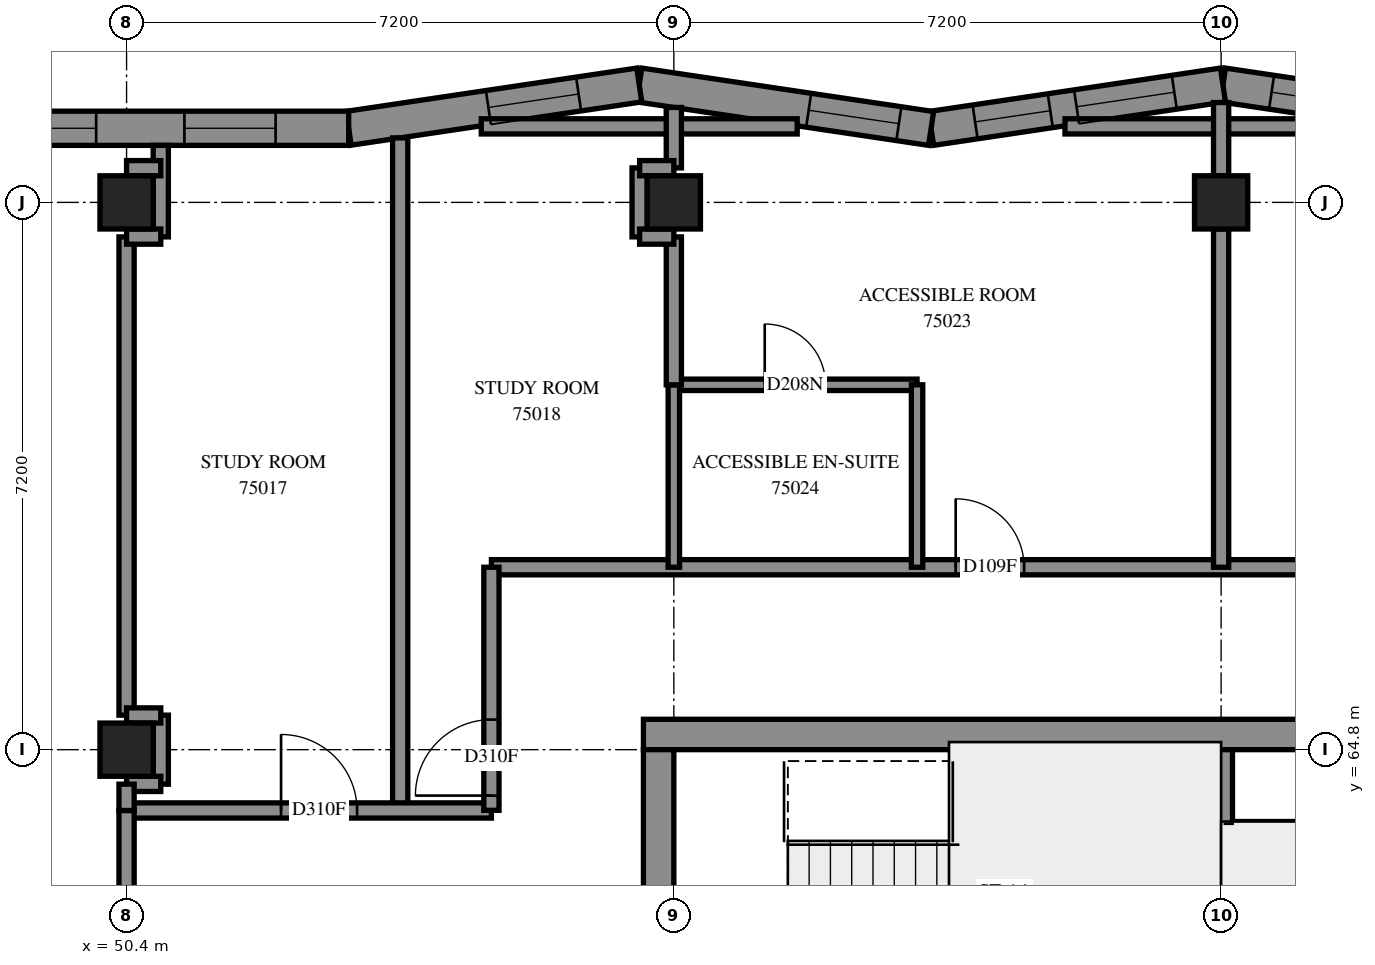
"""IFC4 building model, lengths in metres.
Left out: names, types, materials, properties, quantities, classifications, styles, units other than length and angle.
Written with IfcOpenShell. Run it as: python <this file> out.ifc"""

import sys

from ifc_helpers import new_model, si_unit, direction, frame, frame_2d, origin, origin_2d, place, context, subcontext, project, spatial, polyline, rectangle, outline, extrude, element, fill, save


model = new_model("IFC4")
c1 = context("Model", 3, precision=1e-05, world=origin(), true_north=direction((0.0, 1.0)))
c2 = subcontext(c1, "Body", "Model", "MODEL_VIEW")
j1 = project(units=[si_unit("LENGTHUNIT", "METRE"), si_unit("PLANEANGLEUNIT", "RADIAN")], contexts=[c1])
p1 = place(None, origin())
s1 = spatial("IfcSite", under=j1, at=p1, CompositionType="ELEMENT")
p2 = place(p1, origin())
s2 = spatial("IfcBuilding", under=s1, at=p2, CompositionType="ELEMENT")
p3 = place(p2, frame((0.0, 0.0, 274.4)))
s3 = spatial("IfcBuildingStorey", under=s2, at=p3, CompositionType="ELEMENT", Elevation=274.4)
for number, where, z_axis, x_axis in (
    (1, (50.4, 64.8, 0.0), (0.0, 0.0, 1.0), (1.0, 0.0, 0.0)),
    (2, (50.4, 72.0, 0.0), (0.0, 0.0, 1.0), (1.0, 0.0, 0.0)),
    (3, (57.6, 72.0, 0.0), (0.0, 0.0, 1.0), (1.0, 0.0, 0.0)),
    (4, (64.8, 72.0, 0.0), (0.0, 0.0, 1.0), (1.0, 0.0, 0.0)),
):
    element("IfcColumn", number, at=place(p3, frame(where, z_axis=z_axis, x_axis=x_axis)), inside=s3, PredefinedType="COLUMN", context=c2, shape_type="SweptSolid", body=[
        extrude(rectangle(XDim=0.7, YDim=0.7, at=origin_2d()), origin(), (0.0, 0.0, 1.0), 3.1),
    ])
p4 = place(p3, frame((57.2, 65.0, -0.3), z_axis=(0.0, 0.0, 1.0), x_axis=(1.0, 0.0, 0.0)))
e5 = element("IfcWall", 5, at=p4, inside=s3, PredefinedType="SHEAR", context=c2, shape_type="SweptSolid", body=[
    extrude(rectangle(XDim=15.2, YDim=0.4, at=frame_2d((7.6, 0.0))), origin(), (0.0, 0.0, 1.0), 2.7),
])
p5 = place(p4, frame((10.4, 0.0, 0.3)))
e6 = element("IfcOpeningElement", 6, at=p5, cuts=e5, PredefinedType="OPENING", context=c2, shape_type="SweptSolid", body=[
    extrude(rectangle(XDim=0.8, YDim=2.1, at=frame_2d((0.4, 1.05))), frame((0.0, 0.21, 0.0), z_axis=(0.0, -1.0, 0.0), x_axis=(1.0, 0.0, 0.0)), (0.0, 0.0, 1.0), 0.42),
])
p6 = place(p3, frame((57.4, 50.4, -0.3), z_axis=(0.0, 0.0, 1.0), x_axis=(0.0, 1.0, 0.0)))
e7 = element("IfcWall", 7, at=p6, inside=s3, PredefinedType="SHEAR", context=c2, shape_type="SweptSolid", body=[
    extrude(rectangle(XDim=14.4, YDim=0.4, at=frame_2d((7.2, 0.0))), origin(), (0.0, 0.0, 1.0), 2.7),
])
p7 = place(p6, frame((4.55, 0.0, 0.3)))
e8 = element("IfcOpeningElement", 8, at=p7, cuts=e7, PredefinedType="OPENING", context=c2, shape_type="SweptSolid", body=[
    extrude(rectangle(XDim=1.1, YDim=2.1, at=frame_2d((0.55, 1.05))), frame((0.0, 0.21, 0.0), z_axis=(0.0, -1.0, 0.0), x_axis=(1.0, 0.0, 0.0)), (0.0, 0.0, 1.0), 0.42),
])
p8 = place(p6, frame((11.35, 0.0, 0.3)))
e9 = element("IfcOpeningElement", 9, at=p8, cuts=e7, PredefinedType="OPENING", context=c2, shape_type="SweptSolid", body=[
    extrude(rectangle(XDim=1.1, YDim=2.1, at=frame_2d((0.55, 1.05))), frame((0.0, 0.21, 0.0), z_axis=(0.0, -1.0, 0.0), x_axis=(1.0, 0.0, 0.0)), (0.0, 0.0, 1.0), 0.42),
])
p9 = place(p3, frame((64.8, 60.6, 0.0), z_axis=(0.0, 0.0, 1.0), x_axis=(0.0, 1.0, 0.0)))
e10 = element("IfcWall", 10, at=p9, inside=s3, PredefinedType="SOLIDWALL", context=c2, shape_type="SweptSolid", body=[
    extrude(rectangle(XDim=4.2, YDim=0.3, at=frame_2d((2.1, 0.0))), origin(), (0.0, 0.0, 1.0), 3.1),
])
p10 = place(p3, frame((68.664, 72.972, 0.0), z_axis=(0.0, 0.0, 1.0), x_axis=(-0.9890847468, 0.1473477641, 0.0)))
e11 = element("IfcWall", 11, at=p10, inside=s3, PredefinedType="SOLIDWALL", context=c2, shape_type="SweptSolid", body=[
    extrude(outline(polyline([(0.034, -0.225), (3.916, -0.225), (3.849, 0.225), (-0.034, 0.225), (0.034, -0.225)])), origin(), (0.0, 0.0, 1.0), 3.1),
])
p11 = place(p10, frame((0.585, 0.0, 0.45)))
e12 = element("IfcOpeningElement", 12, at=p11, cuts=e11, PredefinedType="OPENING", context=c2, shape_type="SweptSolid", body=[
    extrude(rectangle(XDim=1.0, YDim=2.5, at=frame_2d((0.5, 1.25))), frame((0.0, 0.235, 0.0), z_axis=(0.0, -1.0, 0.0), x_axis=(1.0, 0.0, 0.0)), (0.0, 0.0, 1.0), 0.47),
])
p12 = place(p10, frame((1.935, 0.0, 0.45)))
e13 = element("IfcOpeningElement", 13, at=p12, cuts=e11, PredefinedType="OPENING", context=c2, shape_type="SweptSolid", body=[
    extrude(rectangle(XDim=1.3, YDim=2.5, at=frame_2d((0.65, 1.25))), frame((0.0, 0.235, 0.0), z_axis=(0.0, -1.0, 0.0), x_axis=(1.0, 0.0, 0.0)), (0.0, 0.0, 1.0), 0.47),
])
p13 = place(p3, frame((64.824, 73.544, 0.0), z_axis=(0.0, 0.0, 1.0), x_axis=(-0.9890847468, -0.1473477641, 0.0)))
e14 = element("IfcWall", 14, at=p13, inside=s3, PredefinedType="SOLIDWALL", context=c2, shape_type="SweptSolid", body=[
    extrude(outline(polyline([(-0.034, -0.225), (3.849, -0.225), (3.916, 0.225), (0.034, 0.225), (-0.034, -0.225)])), origin(), (0.0, 0.0, 1.0), 3.1),
])
p14 = place(p13, frame((0.647, 0.0, 0.45)))
e15 = element("IfcOpeningElement", 15, at=p14, cuts=e14, PredefinedType="OPENING", context=c2, shape_type="SweptSolid", body=[
    extrude(rectangle(XDim=1.3, YDim=2.5, at=frame_2d((0.65, 1.25))), frame((0.0, 0.235, 0.0), z_axis=(0.0, -1.0, 0.0), x_axis=(1.0, 0.0, 0.0)), (0.0, 0.0, 1.0), 0.47),
])
p15 = place(p13, frame((2.297, 0.0, 0.45)))
e16 = element("IfcOpeningElement", 16, at=p15, cuts=e14, PredefinedType="OPENING", context=c2, shape_type="SweptSolid", body=[
    extrude(rectangle(XDim=1.0, YDim=2.5, at=frame_2d((0.5, 1.25))), frame((0.0, 0.235, 0.0), z_axis=(0.0, -1.0, 0.0), x_axis=(1.0, 0.0, 0.0)), (0.0, 0.0, 1.0), 0.47),
])
p16 = place(p3, frame((60.984, 72.972, 0.0), z_axis=(0.0, 0.0, 1.0), x_axis=(-0.9890847468, 0.1473477641, 0.0)))
e17 = element("IfcWall", 17, at=p16, inside=s3, PredefinedType="SOLIDWALL", context=c2, shape_type="SweptSolid", body=[
    extrude(outline(polyline([(0.034, -0.225), (3.916, -0.225), (3.849, 0.225), (-0.034, 0.225), (0.034, -0.225)])), origin(), (0.0, 0.0, 1.0), 3.1),
])
p17 = place(p16, frame((0.429, 0.0, 0.45)))
e18 = element("IfcOpeningElement", 18, at=p17, cuts=e17, PredefinedType="OPENING", context=c2, shape_type="SweptSolid", body=[
    extrude(rectangle(XDim=1.2, YDim=2.55, at=frame_2d((0.6, 1.275))), frame((0.0, 0.235, 0.0), z_axis=(0.0, -1.0, 0.0), x_axis=(1.0, 0.0, 0.0)), (0.0, 0.0, 1.0), 0.47),
])
p18 = place(p3, frame((57.145, 73.544, 0.0), z_axis=(0.0, 0.0, 1.0), x_axis=(-0.9890857661, -0.1473409217, 0.0)))
e19 = element("IfcWall", 19, at=p18, inside=s3, PredefinedType="SOLIDWALL", context=c2, shape_type="SweptSolid", body=[
    extrude(outline(polyline([(-0.034, -0.225), (3.849, -0.225), (3.882, 0.225), (0.034, 0.225), (-0.034, -0.225)])), origin(), (0.0, 0.0, 1.0), 3.1),
])
p19 = place(p18, frame((0.807, 0.0, 0.45)))
e20 = element("IfcOpeningElement", 20, at=p19, cuts=e19, PredefinedType="OPENING", context=c2, shape_type="SweptSolid", body=[
    extrude(rectangle(XDim=1.2, YDim=2.55, at=frame_2d((0.6, 1.275))), frame((0.0, 0.235, 0.0), z_axis=(0.0, -1.0, 0.0), x_axis=(1.0, 0.0, 0.0)), (0.0, 0.0, 1.0), 0.47),
])
p20 = place(p3, frame((53.322, 72.975, 0.0), z_axis=(0.0, 0.0, 1.0), x_axis=(-1.0, 0.0, 0.0)))
e21 = element("IfcWall", 21, at=p20, inside=s3, PredefinedType="SOLIDWALL", context=c2, shape_type="SweptSolid", body=[
    extrude(outline(polyline([(0.017, -0.225), (7.696, -0.225), (7.729, 0.225), (-0.017, 0.225), (0.017, -0.225)])), origin(), (0.0, 0.0, 1.0), 3.1),
])
p21 = place(p20, frame((3.322, 0.0, 0.45)))
e22 = element("IfcOpeningElement", 22, at=p21, cuts=e21, PredefinedType="OPENING", context=c2, shape_type="SweptSolid", body=[
    extrude(rectangle(XDim=2.8, YDim=2.55, at=frame_2d((1.4, 1.275))), frame((0.0, 0.235, 0.0), z_axis=(0.0, -1.0, 0.0), x_axis=(1.0, 0.0, 0.0)), (0.0, 0.0, 1.0), 0.47),
])
p22 = place(p20, frame((0.961, 0.0, 0.45)))
e23 = element("IfcOpeningElement", 23, at=p22, cuts=e21, PredefinedType="OPENING", context=c2, shape_type="SweptSolid", body=[
    extrude(rectangle(XDim=1.2, YDim=2.55, at=frame_2d((0.6, 1.275))), frame((0.0, 0.235, 0.0), z_axis=(0.0, -1.0, 0.0), x_axis=(1.0, 0.0, 0.0)), (0.0, 0.0, 1.0), 0.47),
])
p23 = place(p3, frame((64.95, 63.78, 0.0), z_axis=(0.0, 0.0, 1.0), x_axis=(1.0, 0.0, 0.0)))
e24 = element("IfcWall", 24, at=p23, inside=s3, PredefinedType="PARTITIONING", context=c2, shape_type="SweptSolid", body=[
    extrude(rectangle(XDim=6.25, YDim=0.15, at=frame_2d((3.125, 0.0))), origin(), (0.0, 0.0, 1.0), 3.1),
])
p24 = place(p3, frame((55.2, 67.2, 0.0), z_axis=(0.0, 0.0, 1.0), x_axis=(1.0, 0.0, 0.0)))
e25 = element("IfcWall", 25, at=p24, inside=s3, PredefinedType="PARTITIONING", context=c2, shape_type="SweptSolid", body=[
    extrude(rectangle(XDim=19.2, YDim=0.2, at=frame_2d((9.6, 0.0))), origin(), (0.0, 0.0, 1.0), 3.1),
])
p25 = place(p24, frame((6.108, 0.0, 0.0)))
e26 = element("IfcOpeningElement", 26, at=p25, cuts=e25, PredefinedType="OPENING", context=c2, shape_type="SweptSolid", body=[
    extrude(rectangle(XDim=0.9, YDim=2.1, at=frame_2d((0.45, 1.05))), frame((0.0, 0.11, 0.0), z_axis=(0.0, -1.0, 0.0), x_axis=(1.0, 0.0, 0.0)), (0.0, 0.0, 1.0), 0.22),
])
p26 = place(p24, frame((11.675, 0.0, 0.0)))
e27 = element("IfcOpeningElement", 27, at=p26, cuts=e25, PredefinedType="OPENING", context=c2, shape_type="SweptSolid", body=[
    extrude(rectangle(XDim=1.0, YDim=2.1, at=frame_2d((0.5, 1.05))), frame((0.0, 0.11, 0.0), z_axis=(0.0, -1.0, 0.0), x_axis=(1.0, 0.0, 0.0)), (0.0, 0.0, 1.0), 0.22),
])
p27 = place(p24, frame((13.725, 0.0, 0.0)))
e28 = element("IfcOpeningElement", 28, at=p27, cuts=e25, PredefinedType="OPENING", context=c2, shape_type="SweptSolid", body=[
    extrude(rectangle(XDim=1.0, YDim=2.1, at=frame_2d((0.5, 1.05))), frame((0.0, 0.11, 0.0), z_axis=(0.0, -1.0, 0.0), x_axis=(1.0, 0.0, 0.0)), (0.0, 0.0, 1.0), 0.22),
])
p28 = place(p3, frame((54.0, 64.0, 0.0), z_axis=(0.0, 0.0, 1.0), x_axis=(0.0, 1.0, 0.0)))
e29 = element("IfcWall", 29, at=p28, inside=s3, PredefinedType="PARTITIONING", context=c2, shape_type="SweptSolid", body=[
    extrude(rectangle(XDim=8.848, YDim=0.2, at=frame_2d((4.424, 0.0))), origin(), (0.0, 0.0, 1.0), 3.1),
])
p29 = place(p3, frame((50.4, 65.254, 0.0), z_axis=(0.0, 0.0, 1.0), x_axis=(0.0, 1.0, 0.0)))
e30 = element("IfcWall", 30, at=p29, inside=s3, PredefinedType="PARTITIONING", context=c2, shape_type="SweptSolid", body=[
    extrude(rectangle(XDim=6.292, YDim=0.2, at=frame_2d((3.146, 0.0))), origin(), (0.0, 0.0, 1.0), 3.1),
])
p30 = place(p3, frame((50.4, 64.0, 0.0), z_axis=(0.0, 0.0, 1.0), x_axis=(1.0, 0.0, 0.0)))
e31 = element("IfcWall", 31, at=p30, inside=s3, PredefinedType="PARTITIONING", context=c2, shape_type="SweptSolid", body=[
    extrude(rectangle(XDim=4.8, YDim=0.2, at=frame_2d((2.4, 0.0))), origin(), (0.0, 0.0, 1.0), 3.1),
])
p31 = place(p30, frame((2.033, 0.0, 0.0)))
e32 = element("IfcOpeningElement", 32, at=p31, cuts=e31, PredefinedType="OPENING", context=c2, shape_type="SweptSolid", body=[
    extrude(rectangle(XDim=1.0, YDim=2.1, at=frame_2d((0.5, 1.05))), frame((0.0, 0.11, 0.0), z_axis=(0.0, -1.0, 0.0), x_axis=(1.0, 0.0, 0.0)), (0.0, 0.0, 1.0), 0.22),
])
p32 = place(p3, frame((64.8, 67.2, 0.0), z_axis=(0.0, 0.0, 1.0), x_axis=(0.0, 1.0, 0.0)))
e33 = element("IfcWall", 33, at=p32, inside=s3, PredefinedType="PARTITIONING", context=c2, shape_type="SweptSolid", body=[
    extrude(rectangle(XDim=4.45, YDim=0.2, at=frame_2d((2.225, 0.0))), origin(), (0.0, 0.0, 1.0), 3.1),
])
for number, where, z_axis, x_axis in (
    (34, (62.746, 73.0, 0.0), (0.0, 0.0, 1.0), (1.0, 0.0, 0.0)),
    (35, (55.067, 73.0, 0.0), (0.0, 0.0, 1.0), (1.0, 0.0, 0.0)),
):
    element("IfcWall", number, at=place(p3, frame(where, z_axis=z_axis, x_axis=x_axis)), inside=s3, PredefinedType="PARTITIONING", context=c2, shape_type="SweptSolid", body=[
        extrude(rectangle(XDim=4.156, YDim=0.2, at=frame_2d((2.078, 0.0))), origin(), (0.0, 0.0, 1.0), 3.1),
    ])
p33 = place(p3, frame((57.6, 69.6, 0.0), z_axis=(0.0, 0.0, 1.0), x_axis=(1.0, 0.0, 0.0)))
e36 = element("IfcWall", 36, at=p33, inside=s3, PredefinedType="PARTITIONING", context=c2, shape_type="SweptSolid", body=[
    extrude(rectangle(XDim=3.2, YDim=0.15, at=frame_2d((1.6, 0.0))), origin(), (0.0, 0.0, 1.0), 3.1),
])
p34 = place(p33, frame((1.196, 0.0, 0.0)))
e37 = element("IfcOpeningElement", 37, at=p34, cuts=e36, PredefinedType="OPENING", context=c2, shape_type="SweptSolid", body=[
    extrude(rectangle(XDim=0.8, YDim=2.1, at=frame_2d((0.4, 1.05))), frame((0.0, 0.085, 0.0), z_axis=(0.0, -1.0, 0.0), x_axis=(1.0, 0.0, 0.0)), (0.0, 0.0, 1.0), 0.17),
])
p35 = place(p3, frame((55.2, 64.002, 0.0), z_axis=(0.0, 0.0, 1.0), x_axis=(0.0, 1.0, 0.0)))
e38 = element("IfcWall", 38, at=p35, inside=s3, PredefinedType="PARTITIONING", context=c2, shape_type="SweptSolid", body=[
    extrude(rectangle(XDim=3.198, YDim=0.2, at=frame_2d((1.599, 0.0))), origin(), (0.0, 0.0, 1.0), 3.1),
])
p36 = place(p35, frame((0.194, 0.0, 0.0)))
e39 = element("IfcOpeningElement", 39, at=p36, cuts=e38, PredefinedType="OPENING", context=c2, shape_type="SweptSolid", body=[
    extrude(rectangle(XDim=1.0, YDim=2.1, at=frame_2d((0.5, 1.05))), frame((0.0, 0.11, 0.0), z_axis=(0.0, -1.0, 0.0), x_axis=(1.0, 0.0, 0.0)), (0.0, 0.0, 1.0), 0.22),
])
for number, where, z_axis, x_axis in (
    (40, (60.8, 67.2, 0.0), (0.0, 0.0, 1.0), (0.0, 1.0, 0.0)),
    (41, (57.6, 67.2, 0.0), (0.0, 0.0, 1.0), (0.0, 1.0, 0.0)),
):
    element("IfcWall", number, at=place(p3, frame(where, z_axis=z_axis, x_axis=x_axis)), inside=s3, PredefinedType="PARTITIONING", context=c2, shape_type="SweptSolid", body=[
        extrude(rectangle(XDim=2.4, YDim=0.15, at=frame_2d((1.2, 0.0))), origin(), (0.0, 0.0, 1.0), 3.1),
    ])
p37 = place(p3, frame((57.6, 69.6, 0.0), z_axis=(0.0, 0.0, 1.0), x_axis=(0.0, 1.0, 0.0)))
e42 = element("IfcWall", 42, at=p37, inside=s3, PredefinedType="PARTITIONING", context=c2, shape_type="SweptSolid", body=[
    extrude(rectangle(XDim=1.946, YDim=0.2, at=frame_2d((0.973, 0.0))), origin(), (0.0, 0.0, 1.0), 3.1),
])
p38 = place(p3, frame((50.4, 62.202, 0.0), z_axis=(0.0, 0.0, 1.0), x_axis=(0.0, 1.0, 0.0)))
e43 = element("IfcWall", 43, at=p38, inside=s3, PredefinedType="PARTITIONING", context=c2, shape_type="SweptSolid", body=[
    extrude(rectangle(XDim=1.798, YDim=0.2, at=frame_2d((0.899, 0.0))), origin(), (0.0, 0.0, 1.0), 3.1),
])
p39 = place(p3, frame((50.85, 64.346, 0.0), z_axis=(0.0, 0.0, 1.0), x_axis=(0.0, 1.0, 0.0)))
e44 = element("IfcWall", 44, at=p39, inside=s3, PredefinedType="PARTITIONING", context=c2, shape_type="SweptSolid", body=[
    extrude(rectangle(XDim=0.908, YDim=0.2, at=frame_2d((0.454, 0.0))), origin(), (0.0, 0.0, 1.0), 3.1),
])
p40 = place(p3, frame((50.85, 71.546, 0.0), z_axis=(0.0, 0.0, 1.0), x_axis=(0.0, 1.0, 0.0)))
e45 = element("IfcWall", 45, at=p40, inside=s3, PredefinedType="PARTITIONING", context=c2, shape_type="SweptSolid", body=[
    extrude(rectangle(XDim=1.204, YDim=0.2, at=frame_2d((0.602, 0.0))), origin(), (0.0, 0.0, 1.0), 3.1),
])
p41 = place(p3, frame((57.15, 71.546, 0.0), z_axis=(0.0, 0.0, 1.0), x_axis=(0.0, 1.0, 0.0)))
e46 = element("IfcWall", 46, at=p41, inside=s3, PredefinedType="PARTITIONING", context=c2, shape_type="SweptSolid", body=[
    extrude(rectangle(XDim=0.908, YDim=0.2, at=frame_2d((0.454, 0.0))), origin(), (0.0, 0.0, 1.0), 3.1),
])
p42 = place(p3, frame((64.8, 72.35, 0.0), z_axis=(0.0, 0.0, 1.0), x_axis=(0.0, 1.0, 0.0)))
e47 = element("IfcWall", 47, at=p42, inside=s3, PredefinedType="PARTITIONING", context=c2, shape_type="SweptSolid", body=[
    extrude(rectangle(XDim=0.963, YDim=0.2, at=frame_2d((0.482, 0.0))), origin(), (0.0, 0.0, 1.0), 3.1),
])
p43 = place(p3, frame((57.6, 72.454, 0.0), z_axis=(0.0, 0.0, 1.0), x_axis=(0.0, 1.0, 0.0)))
e48 = element("IfcWall", 48, at=p43, inside=s3, PredefinedType="PARTITIONING", context=c2, shape_type="SweptSolid", body=[
    extrude(rectangle(XDim=0.795, YDim=0.2, at=frame_2d((0.398, 0.0))), origin(), (0.0, 0.0, 1.0), 3.1),
])
for number, where, z_axis, x_axis in (
    (49, (50.4, 71.55, 0.0), (0.0, 0.0, 1.0), (1.0, 0.0, 0.0)),
    (50, (57.15, 71.55, 0.0), (0.0, 0.0, 1.0), (1.0, 0.0, 0.0)),
    (51, (50.4, 72.45, 0.0), (0.0, 0.0, 1.0), (1.0, 0.0, 0.0)),
    (52, (57.15, 72.45, 0.0), (0.0, 0.0, 1.0), (1.0, 0.0, 0.0)),
    (53, (50.4, 65.25, 0.0), (0.0, 0.0, 1.0), (1.0, 0.0, 0.0)),
    (54, (50.4, 64.35, 0.0), (0.0, 0.0, 1.0), (1.0, 0.0, 0.0)),
):
    element("IfcWall", number, at=place(p3, frame(where, z_axis=z_axis, x_axis=x_axis)), inside=s3, PredefinedType="PARTITIONING", context=c2, shape_type="SweptSolid", body=[
        extrude(rectangle(XDim=0.45, YDim=0.2, at=frame_2d((0.225, 0.0))), origin(), (0.0, 0.0, 1.0), 3.1),
    ])
p44 = place(p3, frame((50.4, 64.0, 0.0), z_axis=(0.0, 0.0, 1.0), x_axis=(0.0, 1.0, 0.0)))
e55 = element("IfcWall", 55, at=p44, inside=s3, PredefinedType="PARTITIONING", context=c2, shape_type="SweptSolid", body=[
    extrude(rectangle(XDim=0.346, YDim=0.2, at=frame_2d((0.173, 0.0))), origin(), (0.0, 0.0, 1.0), 3.1),
])
p45 = place(p19, origin())
e56 = element("IfcWindow", 56, at=p45, inside=s3, PartitioningType="SINGLE_PANEL", PredefinedType="WINDOW", context=c2, shape_type="SweptSolid", body=[
    extrude(rectangle(XDim=1.2, YDim=2.55, at=frame_2d((0.6, 1.275))), frame((0.0, 0.115, 0.0), z_axis=(0.0, -1.0, 0.0), x_axis=(1.0, 0.0, 0.0)), (0.0, 0.0, 1.0), 0.06),
])
fill(e20, e56)
p46 = place(p21, origin())
e57 = element("IfcWindow", 57, at=p46, inside=s3, PartitioningType="SINGLE_PANEL", PredefinedType="WINDOW", context=c2, shape_type="SweptSolid", body=[
    extrude(rectangle(XDim=2.8, YDim=2.55, at=frame_2d((1.4, 1.275))), frame((0.0, 0.205, 0.0), z_axis=(0.0, -1.0, 0.0), x_axis=(1.0, 0.0, 0.0)), (0.0, 0.0, 1.0), 0.06),
])
fill(e22, e57)
p47 = place(p22, origin())
e58 = element("IfcWindow", 58, at=p47, inside=s3, PartitioningType="SINGLE_PANEL", PredefinedType="WINDOW", context=c2, shape_type="SweptSolid", body=[
    extrude(rectangle(XDim=1.2, YDim=2.55, at=frame_2d((0.6, 1.275))), frame((0.0, 0.205, 0.0), z_axis=(0.0, -1.0, 0.0), x_axis=(1.0, 0.0, 0.0)), (0.0, 0.0, 1.0), 0.06),
])
fill(e23, e58)
p48 = place(p31, origin())
e59 = element("IfcDoor", 59, at=p48, inside=s3, OperationType="SINGLE_SWING_RIGHT", PredefinedType="DOOR", context=c2, shape_type="SweptSolid", body=[
    extrude(rectangle(XDim=1.0, YDim=2.1, at=frame_2d((0.5, 1.05))), frame((0.0, 0.025, 0.0), z_axis=(0.0, -1.0, 0.0), x_axis=(1.0, 0.0, 0.0)), (0.0, 0.0, 1.0), 0.05),
])
fill(e32, e59)
p49 = place(p36, origin())
e60 = element("IfcDoor", 60, at=p49, inside=s3, OperationType="SINGLE_SWING_LEFT", PredefinedType="DOOR", context=c2, shape_type="SweptSolid", body=[
    extrude(rectangle(XDim=1.0, YDim=2.1, at=frame_2d((0.5, 1.05))), frame((0.0, 0.025, 0.0), z_axis=(0.0, -1.0, 0.0), x_axis=(1.0, 0.0, 0.0)), (0.0, 0.0, 1.0), 0.05),
])
fill(e39, e60)
p50 = place(p25, origin())
e61 = element("IfcDoor", 61, at=p50, inside=s3, OperationType="SINGLE_SWING_RIGHT", PredefinedType="DOOR", context=c2, shape_type="SweptSolid", body=[
    extrude(rectangle(XDim=0.9, YDim=2.1, at=frame_2d((0.45, 1.05))), frame((0.0, 0.025, 0.0), z_axis=(0.0, -1.0, 0.0), x_axis=(1.0, 0.0, 0.0)), (0.0, 0.0, 1.0), 0.05),
])
fill(e26, e61)
p51 = place(p34, origin())
e62 = element("IfcDoor", 62, at=p51, inside=s3, OperationType="SINGLE_SWING_RIGHT", PredefinedType="DOOR", context=c2, shape_type="SweptSolid", body=[
    extrude(rectangle(XDim=0.8, YDim=2.1, at=frame_2d((0.4, 1.05))), frame((0.0, 0.025, 0.0), z_axis=(0.0, -1.0, 0.0), x_axis=(1.0, 0.0, 0.0)), (0.0, 0.0, 1.0), 0.05),
])
fill(e37, e62)
p52 = place(p12, origin())
e63 = element("IfcWindow", 63, at=p52, inside=s3, PartitioningType="SINGLE_PANEL", PredefinedType="WINDOW", context=c2, shape_type="SweptSolid", body=[
    extrude(rectangle(XDim=1.3, YDim=2.5, at=frame_2d((0.65, 1.25))), frame((0.0, 0.125, 0.0), z_axis=(0.0, -1.0, 0.0), x_axis=(1.0, 0.0, 0.0)), (0.0, 0.0, 1.0), 0.06),
])
fill(e13, e63)
p53 = place(p14, origin())
e64 = element("IfcWindow", 64, at=p53, inside=s3, PartitioningType="SINGLE_PANEL", PredefinedType="WINDOW", context=c2, shape_type="SweptSolid", body=[
    extrude(rectangle(XDim=1.3, YDim=2.5, at=frame_2d((0.65, 1.25))), frame((0.0, 0.125, 0.0), z_axis=(0.0, -1.0, 0.0), x_axis=(1.0, 0.0, 0.0)), (0.0, 0.0, 1.0), 0.06),
])
fill(e15, e64)
p54 = place(p15, origin())
e65 = element("IfcWindow", 65, at=p54, inside=s3, PartitioningType="SINGLE_PANEL", PredefinedType="WINDOW", context=c2, shape_type="SweptSolid", body=[
    extrude(rectangle(XDim=1.0, YDim=2.5, at=frame_2d((0.5, 1.25))), frame((0.0, 0.205, 0.0), z_axis=(0.0, -1.0, 0.0), x_axis=(1.0, 0.0, 0.0)), (0.0, 0.0, 1.0), 0.06),
])
fill(e16, e65)
p55 = place(p17, origin())
e66 = element("IfcWindow", 66, at=p55, inside=s3, PartitioningType="SINGLE_PANEL", PredefinedType="WINDOW", context=c2, shape_type="SweptSolid", body=[
    extrude(rectangle(XDim=1.2, YDim=2.55, at=frame_2d((0.6, 1.275))), frame((0.0, 0.205, 0.0), z_axis=(0.0, -1.0, 0.0), x_axis=(1.0, 0.0, 0.0)), (0.0, 0.0, 1.0), 0.06),
])
fill(e18, e66)
save(model, sys.argv[1])
